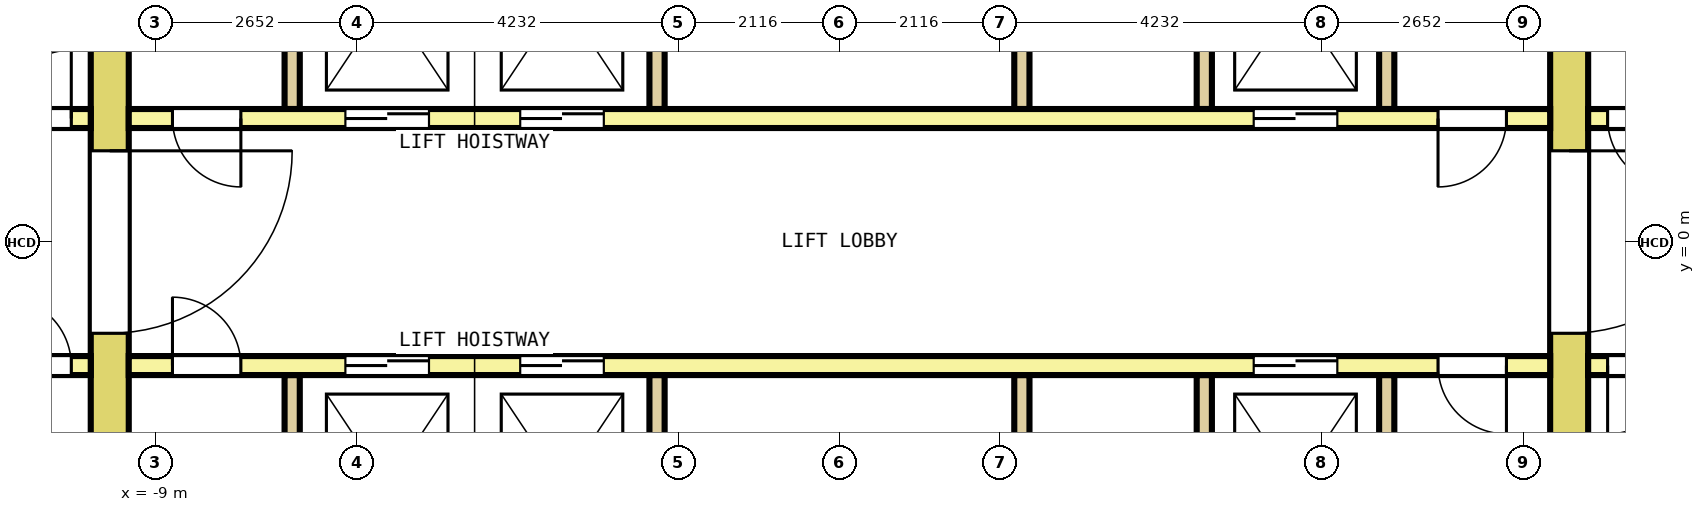
"""IFC4 building model, lengths in metres.
Left out: names, types, materials, properties, quantities, classifications, styles, units other than length and angle.
Written with IfcOpenShell. Run it as: python <this file> out.ifc"""

import sys

from ifc_helpers import new_model, si_unit, direction, frame, frame_2d, origin, place, context, subcontext, project, spatial, rectangle, extrude, element, fill, save


model = new_model("IFC4")
c1 = context("Model", 3, precision=1e-05, world=origin(), true_north=direction((0.0, 1.0)))
c2 = subcontext(c1, "Body", "Model", "MODEL_VIEW")
j1 = project(units=[si_unit("LENGTHUNIT", "METRE"), si_unit("PLANEANGLEUNIT", "RADIAN")], contexts=[c1])
p1 = place(None, origin())
s1 = spatial("IfcSite", under=j1, at=p1, CompositionType="ELEMENT")
p2 = place(p1, origin())
s2 = spatial("IfcBuilding", under=s1, at=p2, CompositionType="ELEMENT")
p3 = place(p2, frame((0.0, 0.0, 117.6)))
s3 = spatial("IfcBuildingStorey", under=s2, at=p3, CompositionType="ELEMENT", Elevation=117.6)
p4 = place(p3, frame((-9.6, -7.7, 0.0), z_axis=(0.0, 0.0, 1.0), x_axis=(0.0, 1.0, 0.0)))
e1 = element("IfcWall", 1, at=p4, inside=s3, PredefinedType="SHEAR", context=c2, shape_type="SweptSolid", body=[
    extrude(rectangle(XDim=15.4, YDim=0.5, at=frame_2d((7.7, 0.0))), origin(), (0.0, 0.0, 1.0), 4.1),
])
p5 = place(p4, frame((6.5, 0.0, 0.0)))
e2 = element("IfcOpeningElement", 2, at=p5, cuts=e1, PredefinedType="OPENING", context=c2, shape_type="SweptSolid", body=[
    extrude(rectangle(XDim=2.4, YDim=2.1, at=frame_2d((1.2, 1.05))), frame((0.0, 0.26, 0.0), z_axis=(0.0, -1.0, 0.0), x_axis=(1.0, 0.0, 0.0)), (0.0, 0.0, 1.0), 0.52),
])
p6 = place(p4, frame((13.4, 0.0, 0.0)))
e3 = element("IfcOpeningElement", 3, at=p6, cuts=e1, PredefinedType="OPENING", context=c2, shape_type="SweptSolid", body=[
    extrude(rectangle(XDim=1.2, YDim=2.1, at=frame_2d((0.6, 1.05))), frame((0.0, 0.26, 0.0), z_axis=(0.0, -1.0, 0.0), x_axis=(1.0, 0.0, 0.0)), (0.0, 0.0, 1.0), 0.52),
])
p7 = place(p4, frame((0.8, 0.0, 0.0)))
e4 = element("IfcOpeningElement", 4, at=p7, cuts=e1, PredefinedType="OPENING", context=c2, shape_type="SweptSolid", body=[
    extrude(rectangle(XDim=1.2, YDim=2.1, at=frame_2d((0.6, 1.05))), frame((0.0, 0.26, 0.0), z_axis=(0.0, -1.0, 0.0), x_axis=(1.0, 0.0, 0.0)), (0.0, 0.0, 1.0), 0.52),
])
p8 = place(p3, frame((9.6, -7.7, 0.0), z_axis=(0.0, 0.0, 1.0), x_axis=(0.0, 1.0, 0.0)))
e5 = element("IfcWall", 5, at=p8, inside=s3, PredefinedType="SHEAR", context=c2, shape_type="SweptSolid", body=[
    extrude(rectangle(XDim=15.4, YDim=0.5, at=frame_2d((7.7, 0.0))), origin(), (0.0, 0.0, 1.0), 4.1),
])
p9 = place(p8, frame((6.5, 0.0, 0.0)))
e6 = element("IfcOpeningElement", 6, at=p9, cuts=e5, PredefinedType="OPENING", context=c2, shape_type="SweptSolid", body=[
    extrude(rectangle(XDim=2.4, YDim=2.1, at=frame_2d((1.2, 1.05))), frame((0.0, 0.26, 0.0), z_axis=(0.0, -1.0, 0.0), x_axis=(1.0, 0.0, 0.0)), (0.0, 0.0, 1.0), 0.52),
])
p10 = place(p8, frame((13.4, 0.0, 0.0)))
e7 = element("IfcOpeningElement", 7, at=p10, cuts=e5, PredefinedType="OPENING", context=c2, shape_type="SweptSolid", body=[
    extrude(rectangle(XDim=1.2, YDim=2.1, at=frame_2d((0.6, 1.05))), frame((0.0, 0.26, 0.0), z_axis=(0.0, -1.0, 0.0), x_axis=(1.0, 0.0, 0.0)), (0.0, 0.0, 1.0), 0.52),
])
p11 = place(p8, frame((0.9, 0.0, 0.0)))
e8 = element("IfcOpeningElement", 8, at=p11, cuts=e5, PredefinedType="OPENING", context=c2, shape_type="SweptSolid", body=[
    extrude(rectangle(XDim=1.0, YDim=2.1, at=frame_2d((0.5, 1.05))), frame((0.0, 0.26, 0.0), z_axis=(0.0, -1.0, 0.0), x_axis=(1.0, 0.0, 0.0)), (0.0, 0.0, 1.0), 0.52),
])
p12 = place(p3, frame((-12.8, 1.625, 0.0), z_axis=(0.0, 0.0, 1.0), x_axis=(1.0, 0.0, 0.0)))
e9 = element("IfcWall", 9, at=p12, inside=s3, PredefinedType="SOLIDWALL", context=c2, shape_type="SweptSolid", body=[
    extrude(rectangle(XDim=2.95, YDim=0.25, at=frame_2d((1.475, 0.0))), origin(), (0.0, 0.0, 1.0), 4.1),
])
p13 = place(p12, frame((0.256, 0.0, 0.0)))
e10 = element("IfcOpeningElement", 10, at=p13, cuts=e9, PredefinedType="OPENING", context=c2, shape_type="SweptSolid", body=[
    extrude(rectangle(XDim=0.9, YDim=2.1, at=frame_2d((0.45, 1.05))), frame((0.0, 0.135, 0.0), z_axis=(0.0, -1.0, 0.0), x_axis=(1.0, 0.0, 0.0)), (0.0, 0.0, 1.0), 0.27),
])
p14 = place(p12, frame((1.794, 0.0, 0.0)))
e11 = element("IfcOpeningElement", 11, at=p14, cuts=e9, PredefinedType="OPENING", context=c2, shape_type="SweptSolid", body=[
    extrude(rectangle(XDim=0.9, YDim=2.1, at=frame_2d((0.45, 1.05))), frame((0.0, 0.135, 0.0), z_axis=(0.0, -1.0, 0.0), x_axis=(1.0, 0.0, 0.0)), (0.0, 0.0, 1.0), 0.27),
])
p15 = place(p3, frame((-9.35, 1.625, 0.0), z_axis=(0.0, 0.0, 1.0), x_axis=(1.0, 0.0, 0.0)))
e12 = element("IfcWall", 12, at=p15, inside=s3, PredefinedType="SOLIDWALL", context=c2, shape_type="SweptSolid", body=[
    extrude(rectangle(XDim=18.7, YDim=0.25, at=frame_2d((9.35, 0.0))), origin(), (0.0, 0.0, 1.0), 4.1),
])
p16 = place(p15, frame((2.85, 0.0, 0.0)))
e13 = element("IfcOpeningElement", 13, at=p16, cuts=e12, PredefinedType="OPENING", context=c2, shape_type="SweptSolid", body=[
    extrude(rectangle(XDim=1.1, YDim=2.1, at=frame_2d((0.55, 1.05))), frame((0.0, 0.135, 0.0), z_axis=(0.0, -1.0, 0.0), x_axis=(1.0, 0.0, 0.0)), (0.0, 0.0, 1.0), 0.27),
])
p17 = place(p15, frame((5.15, 0.0, 0.0)))
e14 = element("IfcOpeningElement", 14, at=p17, cuts=e12, PredefinedType="OPENING", context=c2, shape_type="SweptSolid", body=[
    extrude(rectangle(XDim=1.1, YDim=2.1, at=frame_2d((0.55, 1.05))), frame((0.0, 0.135, 0.0), z_axis=(0.0, -1.0, 0.0), x_axis=(1.0, 0.0, 0.0)), (0.0, 0.0, 1.0), 0.27),
])
p18 = place(p15, frame((14.8, 0.0, 0.0)))
e15 = element("IfcOpeningElement", 15, at=p18, cuts=e12, PredefinedType="OPENING", context=c2, shape_type="SweptSolid", body=[
    extrude(rectangle(XDim=1.1, YDim=2.1, at=frame_2d((0.55, 1.05))), frame((0.0, 0.135, 0.0), z_axis=(0.0, -1.0, 0.0), x_axis=(1.0, 0.0, 0.0)), (0.0, 0.0, 1.0), 0.27),
])
p19 = place(p15, frame((0.575, 0.0, 0.0)))
e16 = element("IfcOpeningElement", 16, at=p19, cuts=e12, PredefinedType="OPENING", context=c2, shape_type="SweptSolid", body=[
    extrude(rectangle(XDim=0.9, YDim=2.1, at=frame_2d((0.45, 1.05))), frame((0.0, 0.135, 0.0), z_axis=(0.0, -1.0, 0.0), x_axis=(1.0, 0.0, 0.0)), (0.0, 0.0, 1.0), 0.27),
])
p20 = place(p15, frame((17.225, 0.0, 0.0)))
e17 = element("IfcOpeningElement", 17, at=p20, cuts=e12, PredefinedType="OPENING", context=c2, shape_type="SweptSolid", body=[
    extrude(rectangle(XDim=0.9, YDim=2.1, at=frame_2d((0.45, 1.05))), frame((0.0, 0.135, 0.0), z_axis=(0.0, -1.0, 0.0), x_axis=(1.0, 0.0, 0.0)), (0.0, 0.0, 1.0), 0.27),
])
p21 = place(p3, frame((9.85, 1.625, 0.0), z_axis=(0.0, 0.0, 1.0), x_axis=(1.0, 0.0, 0.0)))
e18 = element("IfcWall", 18, at=p21, inside=s3, PredefinedType="SOLIDWALL", context=c2, shape_type="SweptSolid", body=[
    extrude(rectangle(XDim=2.95, YDim=0.25, at=frame_2d((1.475, 0.0))), origin(), (0.0, 0.0, 1.0), 4.1),
])
p22 = place(p21, frame((0.256, 0.0, 0.0)))
e19 = element("IfcOpeningElement", 19, at=p22, cuts=e18, PredefinedType="OPENING", context=c2, shape_type="SweptSolid", body=[
    extrude(rectangle(XDim=0.9, YDim=2.1, at=frame_2d((0.45, 1.05))), frame((0.0, 0.135, 0.0), z_axis=(0.0, -1.0, 0.0), x_axis=(1.0, 0.0, 0.0)), (0.0, 0.0, 1.0), 0.27),
])
p23 = place(p21, frame((1.794, 0.0, 0.0)))
e20 = element("IfcOpeningElement", 20, at=p23, cuts=e18, PredefinedType="OPENING", context=c2, shape_type="SweptSolid", body=[
    extrude(rectangle(XDim=0.9, YDim=2.1, at=frame_2d((0.45, 1.05))), frame((0.0, 0.135, 0.0), z_axis=(0.0, -1.0, 0.0), x_axis=(1.0, 0.0, 0.0)), (0.0, 0.0, 1.0), 0.27),
])
for number, where, z_axis, x_axis in (
    (21, (-7.2, 1.75, 0.0), (0.0, 0.0, 1.0), (0.0, 1.0, 0.0)),
    (22, (-2.4, 1.75, 0.0), (0.0, 0.0, 1.0), (0.0, 1.0, 0.0)),
    (23, (2.4, 1.75, 0.0), (0.0, 0.0, 1.0), (0.0, 1.0, 0.0)),
    (24, (4.8, 1.75, 0.0), (0.0, 0.0, 1.0), (0.0, 1.0, 0.0)),
    (25, (7.2, 1.75, 0.0), (0.0, 0.0, 1.0), (0.0, 1.0, 0.0)),
):
    element("IfcWall", number, at=place(p3, frame(where, z_axis=z_axis, x_axis=x_axis)), inside=s3, PredefinedType="SOLIDWALL", context=c2, shape_type="SweptSolid", body=[
        extrude(rectangle(XDim=2.9, YDim=0.2, at=frame_2d((1.45, 0.0))), origin(), (0.0, 0.0, 1.0), 4.1),
    ])
p24 = place(p3, frame((-12.8, -1.625, 0.0), z_axis=(0.0, 0.0, 1.0), x_axis=(1.0, 0.0, 0.0)))
e26 = element("IfcWall", 26, at=p24, inside=s3, PredefinedType="SOLIDWALL", context=c2, shape_type="SweptSolid", body=[
    extrude(rectangle(XDim=2.95, YDim=0.25, at=frame_2d((1.475, 0.0))), origin(), (0.0, 0.0, 1.0), 4.1),
])
p25 = place(p24, frame((0.256, 0.0, 0.0)))
e27 = element("IfcOpeningElement", 27, at=p25, cuts=e26, PredefinedType="OPENING", context=c2, shape_type="SweptSolid", body=[
    extrude(rectangle(XDim=0.9, YDim=2.1, at=frame_2d((0.45, 1.05))), frame((0.0, 0.135, 0.0), z_axis=(0.0, -1.0, 0.0), x_axis=(1.0, 0.0, 0.0)), (0.0, 0.0, 1.0), 0.27),
])
p26 = place(p24, frame((1.794, 0.0, 0.0)))
e28 = element("IfcOpeningElement", 28, at=p26, cuts=e26, PredefinedType="OPENING", context=c2, shape_type="SweptSolid", body=[
    extrude(rectangle(XDim=0.9, YDim=2.1, at=frame_2d((0.45, 1.05))), frame((0.0, 0.135, 0.0), z_axis=(0.0, -1.0, 0.0), x_axis=(1.0, 0.0, 0.0)), (0.0, 0.0, 1.0), 0.27),
])
p27 = place(p3, frame((-9.35, -1.625, 0.0), z_axis=(0.0, 0.0, 1.0), x_axis=(1.0, 0.0, 0.0)))
e29 = element("IfcWall", 29, at=p27, inside=s3, PredefinedType="SOLIDWALL", context=c2, shape_type="SweptSolid", body=[
    extrude(rectangle(XDim=18.7, YDim=0.25, at=frame_2d((9.35, 0.0))), origin(), (0.0, 0.0, 1.0), 4.1),
])
p28 = place(p27, frame((2.85, 0.0, 0.0)))
e30 = element("IfcOpeningElement", 30, at=p28, cuts=e29, PredefinedType="OPENING", context=c2, shape_type="SweptSolid", body=[
    extrude(rectangle(XDim=1.1, YDim=2.1, at=frame_2d((0.55, 1.05))), frame((0.0, 0.135, 0.0), z_axis=(0.0, -1.0, 0.0), x_axis=(1.0, 0.0, 0.0)), (0.0, 0.0, 1.0), 0.27),
])
p29 = place(p27, frame((5.15, 0.0, 0.0)))
e31 = element("IfcOpeningElement", 31, at=p29, cuts=e29, PredefinedType="OPENING", context=c2, shape_type="SweptSolid", body=[
    extrude(rectangle(XDim=1.1, YDim=2.1, at=frame_2d((0.55, 1.05))), frame((0.0, 0.135, 0.0), z_axis=(0.0, -1.0, 0.0), x_axis=(1.0, 0.0, 0.0)), (0.0, 0.0, 1.0), 0.27),
])
p30 = place(p27, frame((14.8, 0.0, 0.0)))
e32 = element("IfcOpeningElement", 32, at=p30, cuts=e29, PredefinedType="OPENING", context=c2, shape_type="SweptSolid", body=[
    extrude(rectangle(XDim=1.1, YDim=2.1, at=frame_2d((0.55, 1.05))), frame((0.0, 0.135, 0.0), z_axis=(0.0, -1.0, 0.0), x_axis=(1.0, 0.0, 0.0)), (0.0, 0.0, 1.0), 0.27),
])
p31 = place(p27, frame((0.575, 0.0, 0.0)))
e33 = element("IfcOpeningElement", 33, at=p31, cuts=e29, PredefinedType="OPENING", context=c2, shape_type="SweptSolid", body=[
    extrude(rectangle(XDim=0.9, YDim=2.1, at=frame_2d((0.45, 1.05))), frame((0.0, 0.135, 0.0), z_axis=(0.0, -1.0, 0.0), x_axis=(1.0, 0.0, 0.0)), (0.0, 0.0, 1.0), 0.27),
])
p32 = place(p27, frame((17.225, 0.0, 0.0)))
e34 = element("IfcOpeningElement", 34, at=p32, cuts=e29, PredefinedType="OPENING", context=c2, shape_type="SweptSolid", body=[
    extrude(rectangle(XDim=0.9, YDim=2.1, at=frame_2d((0.45, 1.05))), frame((0.0, 0.135, 0.0), z_axis=(0.0, -1.0, 0.0), x_axis=(1.0, 0.0, 0.0)), (0.0, 0.0, 1.0), 0.27),
])
p33 = place(p3, frame((9.85, -1.625, 0.0), z_axis=(0.0, 0.0, 1.0), x_axis=(1.0, 0.0, 0.0)))
e35 = element("IfcWall", 35, at=p33, inside=s3, PredefinedType="SOLIDWALL", context=c2, shape_type="SweptSolid", body=[
    extrude(rectangle(XDim=2.95, YDim=0.25, at=frame_2d((1.475, 0.0))), origin(), (0.0, 0.0, 1.0), 4.1),
])
p34 = place(p33, frame((0.256, 0.0, 0.0)))
e36 = element("IfcOpeningElement", 36, at=p34, cuts=e35, PredefinedType="OPENING", context=c2, shape_type="SweptSolid", body=[
    extrude(rectangle(XDim=0.9, YDim=2.1, at=frame_2d((0.45, 1.05))), frame((0.0, 0.135, 0.0), z_axis=(0.0, -1.0, 0.0), x_axis=(1.0, 0.0, 0.0)), (0.0, 0.0, 1.0), 0.27),
])
p35 = place(p33, frame((1.794, 0.0, 0.0)))
e37 = element("IfcOpeningElement", 37, at=p35, cuts=e35, PredefinedType="OPENING", context=c2, shape_type="SweptSolid", body=[
    extrude(rectangle(XDim=0.9, YDim=2.1, at=frame_2d((0.45, 1.05))), frame((0.0, 0.135, 0.0), z_axis=(0.0, -1.0, 0.0), x_axis=(1.0, 0.0, 0.0)), (0.0, 0.0, 1.0), 0.27),
])
for number, where, z_axis, x_axis in (
    (38, (-7.2, -4.65, 0.0), (0.0, 0.0, 1.0), (0.0, 1.0, 0.0)),
    (39, (-2.4, -4.65, 0.0), (0.0, 0.0, 1.0), (0.0, 1.0, 0.0)),
    (40, (2.4, -4.65, 0.0), (0.0, 0.0, 1.0), (0.0, 1.0, 0.0)),
    (41, (4.8, -4.65, 0.0), (0.0, 0.0, 1.0), (0.0, 1.0, 0.0)),
    (42, (7.2, -4.65, 0.0), (0.0, 0.0, 1.0), (0.0, 1.0, 0.0)),
):
    element("IfcWall", number, at=place(p3, frame(where, z_axis=z_axis, x_axis=x_axis)), inside=s3, PredefinedType="SOLIDWALL", context=c2, shape_type="SweptSolid", body=[
        extrude(rectangle(XDim=2.9, YDim=0.2, at=frame_2d((1.45, 0.0))), origin(), (0.0, 0.0, 1.0), 4.1),
    ])
p36 = place(p16, origin())
e43 = element("IfcDoor", 43, at=p36, inside=s3, OperationType="DOUBLE_DOOR_SLIDING", PredefinedType="DOOR", context=c2, shape_type="SweptSolid", body=[
    extrude(rectangle(XDim=1.1, YDim=2.1, at=frame_2d((0.55, 1.05))), frame((0.0, 0.075, 0.0), z_axis=(0.0, -1.0, 0.0), x_axis=(1.0, 0.0, 0.0)), (0.0, 0.0, 1.0), 0.15),
])
fill(e13, e43)
p37 = place(p17, origin())
e44 = element("IfcDoor", 44, at=p37, inside=s3, OperationType="DOUBLE_DOOR_SLIDING", PredefinedType="DOOR", context=c2, shape_type="SweptSolid", body=[
    extrude(rectangle(XDim=1.1, YDim=2.1, at=frame_2d((0.55, 1.05))), frame((0.0, 0.075, 0.0), z_axis=(0.0, -1.0, 0.0), x_axis=(1.0, 0.0, 0.0)), (0.0, 0.0, 1.0), 0.15),
])
fill(e14, e44)
p38 = place(p18, origin())
e45 = element("IfcDoor", 45, at=p38, inside=s3, OperationType="DOUBLE_DOOR_SLIDING", PredefinedType="DOOR", context=c2, shape_type="SweptSolid", body=[
    extrude(rectangle(XDim=1.1, YDim=2.1, at=frame_2d((0.55, 1.05))), frame((0.0, 0.075, 0.0), z_axis=(0.0, -1.0, 0.0), x_axis=(1.0, 0.0, 0.0)), (0.0, 0.0, 1.0), 0.15),
])
fill(e15, e45)
p39 = place(p28, origin())
e46 = element("IfcDoor", 46, at=p39, inside=s3, OperationType="DOUBLE_DOOR_SLIDING", PredefinedType="DOOR", context=c2, shape_type="SweptSolid", body=[
    extrude(rectangle(XDim=1.1, YDim=2.1, at=frame_2d((0.55, 1.05))), frame((0.0, 0.075, 0.0), z_axis=(0.0, -1.0, 0.0), x_axis=(1.0, 0.0, 0.0)), (0.0, 0.0, 1.0), 0.15),
])
fill(e30, e46)
p40 = place(p29, origin())
e47 = element("IfcDoor", 47, at=p40, inside=s3, OperationType="DOUBLE_DOOR_SLIDING", PredefinedType="DOOR", context=c2, shape_type="SweptSolid", body=[
    extrude(rectangle(XDim=1.1, YDim=2.1, at=frame_2d((0.55, 1.05))), frame((0.0, 0.075, 0.0), z_axis=(0.0, -1.0, 0.0), x_axis=(1.0, 0.0, 0.0)), (0.0, 0.0, 1.0), 0.15),
])
fill(e31, e47)
p41 = place(p30, origin())
e48 = element("IfcDoor", 48, at=p41, inside=s3, OperationType="DOUBLE_DOOR_SLIDING", PredefinedType="DOOR", context=c2, shape_type="SweptSolid", body=[
    extrude(rectangle(XDim=1.1, YDim=2.1, at=frame_2d((0.55, 1.05))), frame((0.0, 0.075, 0.0), z_axis=(0.0, -1.0, 0.0), x_axis=(1.0, 0.0, 0.0)), (0.0, 0.0, 1.0), 0.15),
])
fill(e32, e48)
p42 = place(p5, origin())
e49 = element("IfcDoor", 49, at=p42, inside=s3, OperationType="DOUBLE_DOOR_SINGLE_SWING", PredefinedType="DOOR", context=c2, shape_type="SweptSolid", body=[
    extrude(rectangle(XDim=2.4, YDim=2.1, at=frame_2d((1.2, 1.05))), frame((0.0, 0.2, 0.0), z_axis=(0.0, -1.0, 0.0), x_axis=(1.0, 0.0, 0.0)), (0.0, 0.0, 1.0), 0.4),
])
fill(e2, e49)
p43 = place(p9, origin())
e50 = element("IfcDoor", 50, at=p43, inside=s3, OperationType="DOUBLE_DOOR_SINGLE_SWING", PredefinedType="DOOR", context=c2, shape_type="SweptSolid", body=[
    extrude(rectangle(XDim=2.4, YDim=2.1, at=frame_2d((1.2, 1.05))), frame((0.0, 0.2, 0.0), z_axis=(0.0, -1.0, 0.0), x_axis=(1.0, 0.0, 0.0)), (0.0, 0.0, 1.0), 0.4),
])
fill(e6, e50)
p44 = place(p14, origin())
e51 = element("IfcDoor", 51, at=p44, inside=s3, OperationType="SINGLE_SWING_LEFT", PredefinedType="DOOR", context=c2, shape_type="SweptSolid", body=[
    extrude(rectangle(XDim=0.9, YDim=2.1, at=frame_2d((0.45, 1.05))), frame((0.0, 0.075, 0.0), z_axis=(0.0, -1.0, 0.0), x_axis=(1.0, 0.0, 0.0)), (0.0, 0.0, 1.0), 0.15),
])
fill(e11, e51)
p45 = place(p19, origin())
e52 = element("IfcDoor", 52, at=p45, inside=s3, OperationType="SINGLE_SWING_RIGHT", PredefinedType="DOOR", context=c2, shape_type="SweptSolid", body=[
    extrude(rectangle(XDim=0.9, YDim=2.1, at=frame_2d((0.45, 1.05))), frame((0.0, 0.075, 0.0), z_axis=(0.0, -1.0, 0.0), x_axis=(1.0, 0.0, 0.0)), (0.0, 0.0, 1.0), 0.15),
])
fill(e16, e52)
p46 = place(p20, origin())
e53 = element("IfcDoor", 53, at=p46, inside=s3, OperationType="SINGLE_SWING_LEFT", PredefinedType="DOOR", context=c2, shape_type="SweptSolid", body=[
    extrude(rectangle(XDim=0.9, YDim=2.1, at=frame_2d((0.45, 1.05))), frame((0.0, 0.075, 0.0), z_axis=(0.0, -1.0, 0.0), x_axis=(1.0, 0.0, 0.0)), (0.0, 0.0, 1.0), 0.15),
])
fill(e17, e53)
p47 = place(p22, origin())
e54 = element("IfcDoor", 54, at=p47, inside=s3, OperationType="SINGLE_SWING_RIGHT", PredefinedType="DOOR", context=c2, shape_type="SweptSolid", body=[
    extrude(rectangle(XDim=0.9, YDim=2.1, at=frame_2d((0.45, 1.05))), frame((0.0, 0.075, 0.0), z_axis=(0.0, -1.0, 0.0), x_axis=(1.0, 0.0, 0.0)), (0.0, 0.0, 1.0), 0.15),
])
fill(e19, e54)
p48 = place(p26, origin())
e55 = element("IfcDoor", 55, at=p48, inside=s3, OperationType="SINGLE_SWING_LEFT", PredefinedType="DOOR", context=c2, shape_type="SweptSolid", body=[
    extrude(rectangle(XDim=0.9, YDim=2.1, at=frame_2d((0.45, 1.05))), frame((0.0, 0.075, 0.0), z_axis=(0.0, -1.0, 0.0), x_axis=(1.0, 0.0, 0.0)), (0.0, 0.0, 1.0), 0.15),
])
fill(e28, e55)
p49 = place(p31, origin())
e56 = element("IfcDoor", 56, at=p49, inside=s3, OperationType="SINGLE_SWING_RIGHT", PredefinedType="DOOR", context=c2, shape_type="SweptSolid", body=[
    extrude(rectangle(XDim=0.9, YDim=2.1, at=frame_2d((0.45, 1.05))), frame((0.0, 0.075, 0.0), z_axis=(0.0, -1.0, 0.0), x_axis=(1.0, 0.0, 0.0)), (0.0, 0.0, 1.0), 0.15),
])
fill(e33, e56)
p50 = place(p32, origin())
e57 = element("IfcDoor", 57, at=p50, inside=s3, OperationType="SINGLE_SWING_LEFT", PredefinedType="DOOR", context=c2, shape_type="SweptSolid", body=[
    extrude(rectangle(XDim=0.9, YDim=2.1, at=frame_2d((0.45, 1.05))), frame((0.0, 0.075, 0.0), z_axis=(0.0, -1.0, 0.0), x_axis=(1.0, 0.0, 0.0)), (0.0, 0.0, 1.0), 0.15),
])
fill(e34, e57)
p51 = place(p34, origin())
e58 = element("IfcDoor", 58, at=p51, inside=s3, OperationType="SINGLE_SWING_RIGHT", PredefinedType="DOOR", context=c2, shape_type="SweptSolid", body=[
    extrude(rectangle(XDim=0.9, YDim=2.1, at=frame_2d((0.45, 1.05))), frame((0.0, 0.075, 0.0), z_axis=(0.0, -1.0, 0.0), x_axis=(1.0, 0.0, 0.0)), (0.0, 0.0, 1.0), 0.15),
])
fill(e36, e58)
save(model, sys.argv[1])
